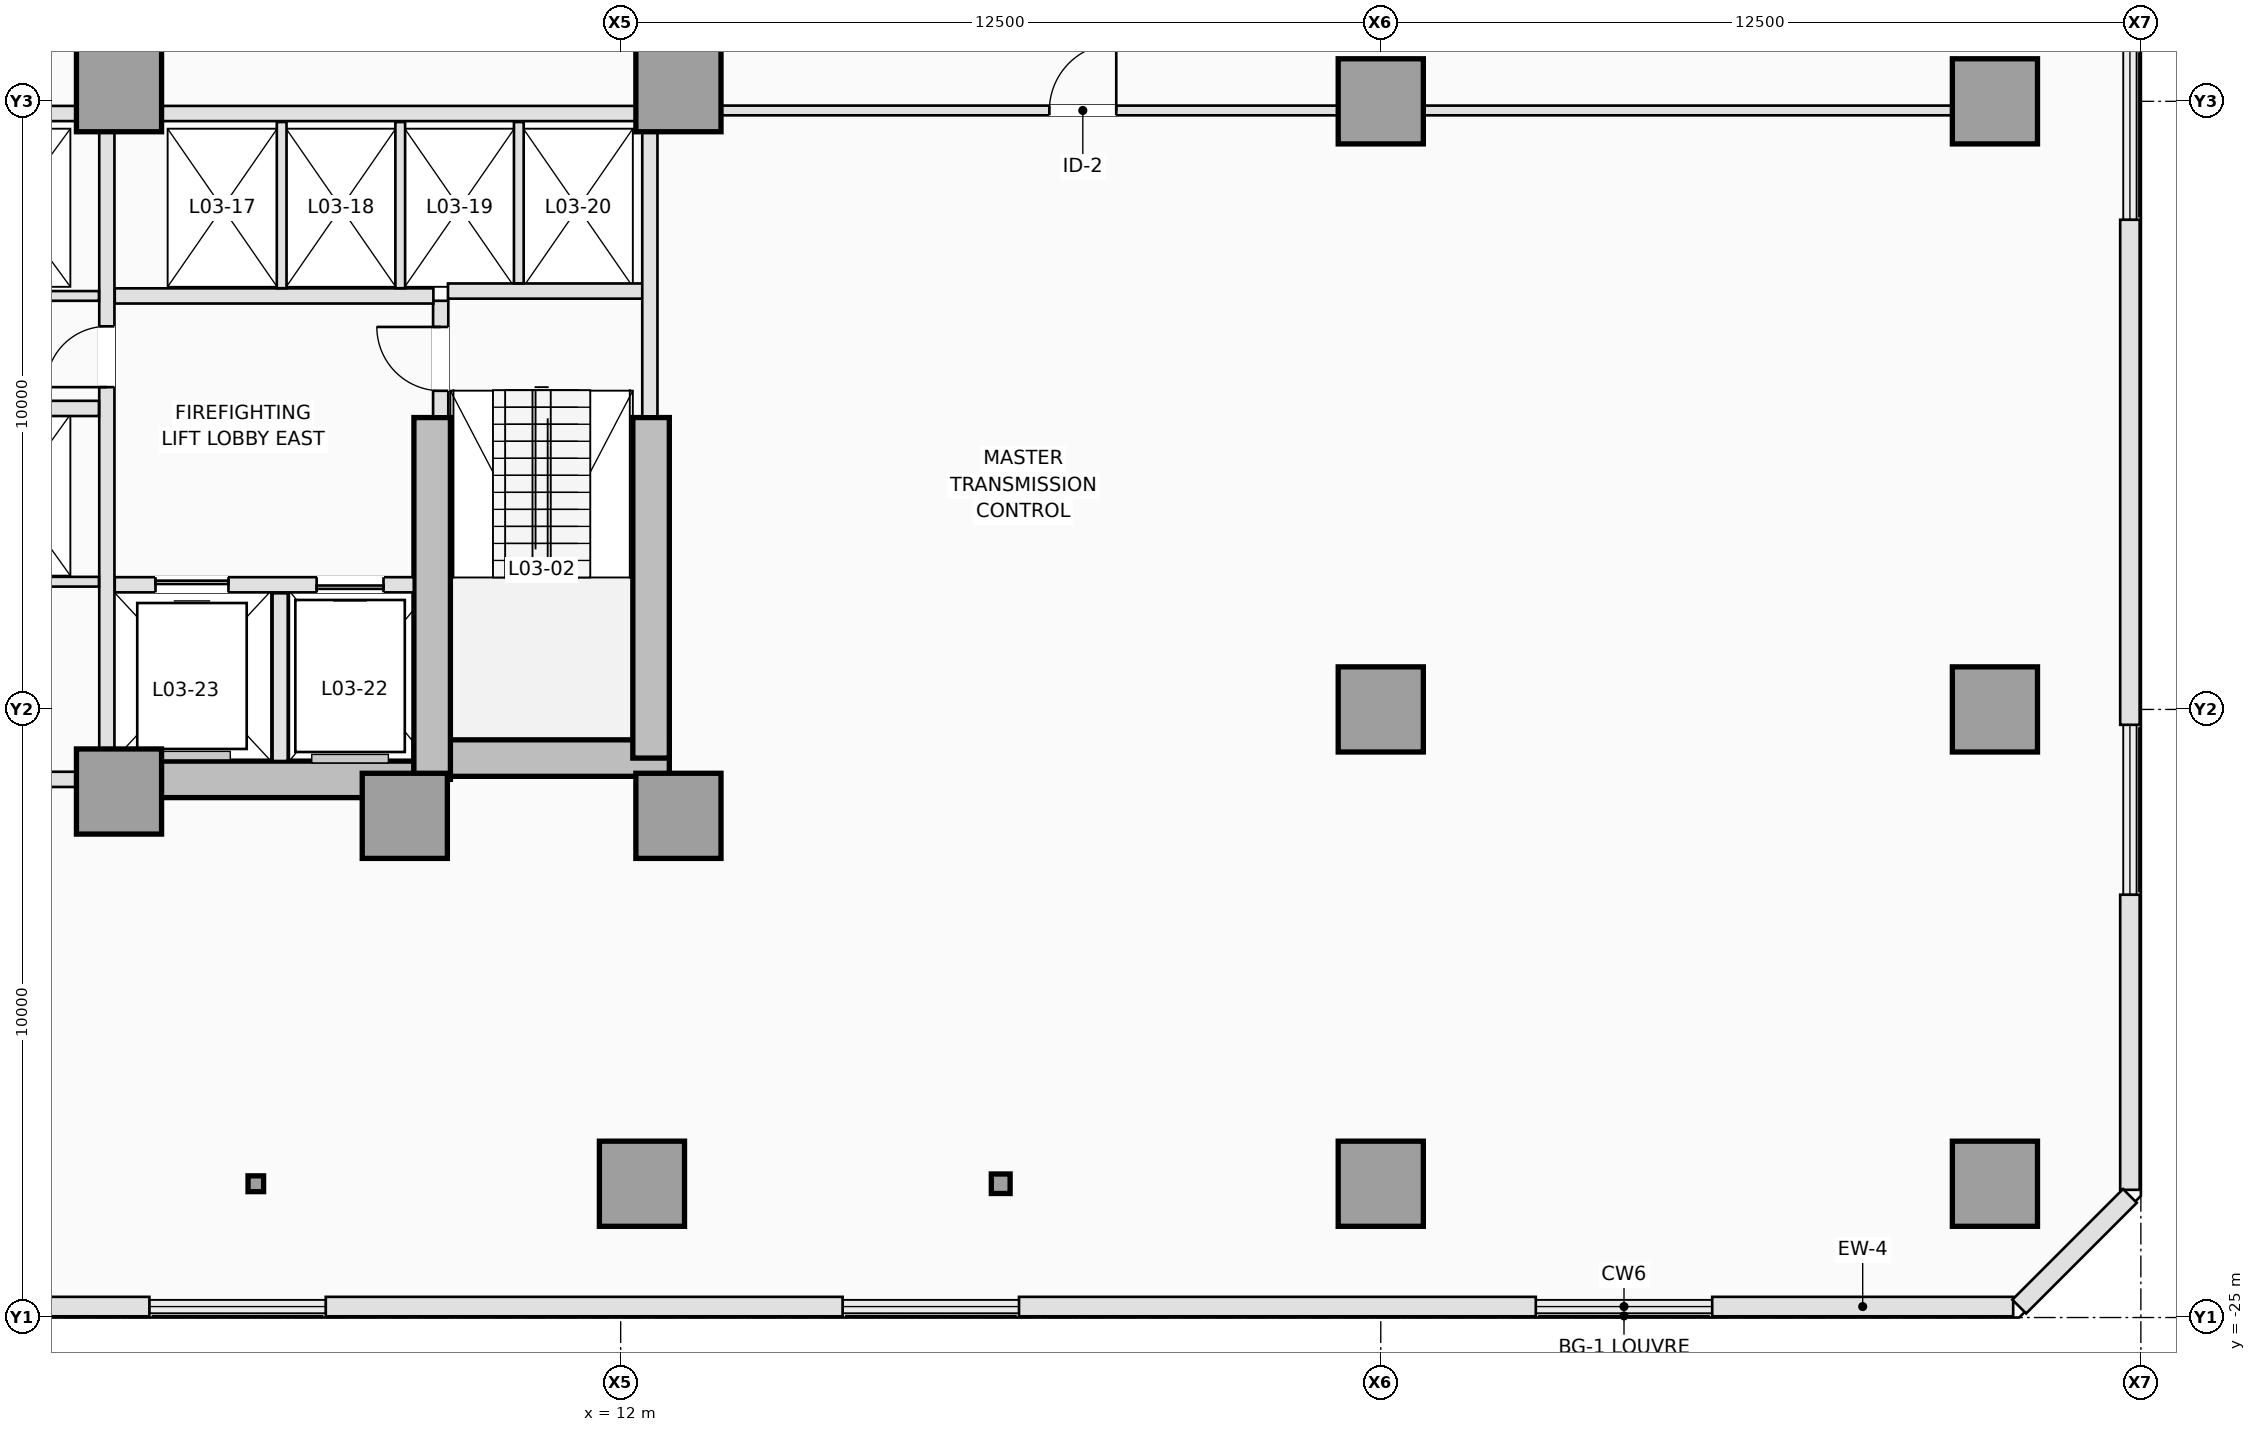
"""IFC4 building model, lengths in metres.
Left out: names, types, materials, properties, quantities, classifications, styles, units other than length and angle.
Written with IfcOpenShell. Run it as: python <this file> out.ifc"""

import sys

from ifc_helpers import new_model, si_unit, direction, frame, frame_2d, origin, origin_2d, place, context, subcontext, project, spatial, rectangle, i_section, extrude, element, fill, save


model = new_model("IFC4")
c1 = context("Model", 3, precision=1e-05, world=origin(), true_north=direction((0.0, 1.0)))
c2 = subcontext(c1, "Body", "Model", "MODEL_VIEW")
j1 = project(units=[si_unit("LENGTHUNIT", "METRE"), si_unit("PLANEANGLEUNIT", "RADIAN")], contexts=[c1])
p1 = place(None, origin())
s1 = spatial("IfcSite", under=j1, at=p1, CompositionType="ELEMENT")
p2 = place(p1, origin())
s2 = spatial("IfcBuilding", under=s1, at=p2, CompositionType="ELEMENT")
p3 = place(p2, frame((0.0, 0.0, 14.0)))
s3 = spatial("IfcBuildingStorey", under=s2, at=p3, CompositionType="ELEMENT", Elevation=14.0)
p4 = place(p3, frame((3.75, -16.15, 0.0), z_axis=(0.0, 0.0, 1.0), x_axis=(1.0, 0.0, 0.0)))
e1 = element("IfcWall", 1, at=p4, inside=s3, PredefinedType="SHEAR", context=c2, shape_type="SweptSolid", body=[
    extrude(rectangle(XDim=5.15, YDim=0.6, at=frame_2d((2.575, 0.0))), origin(), (0.0, 0.0, 1.0), 4.5),
])
p5 = place(p3, frame((8.6, -15.8, 0.0), z_axis=(0.0, 0.0, 1.0), x_axis=(1.0, 0.0, 0.0)))
e2 = element("IfcWall", 2, at=p5, inside=s3, PredefinedType="SHEAR", context=c2, shape_type="SweptSolid", body=[
    extrude(rectangle(XDim=4.2, YDim=0.6, at=frame_2d((2.1, 0.0))), origin(), (0.0, 0.0, 1.0), 4.5),
])
p6 = place(p3, frame((12.5, -15.8, 0.0), z_axis=(0.0, 0.0, 1.0), x_axis=(0.0, 1.0, 0.0)))
e3 = element("IfcWall", 3, at=p6, inside=s3, PredefinedType="SHEAR", context=c2, shape_type="SweptSolid", body=[
    extrude(rectangle(XDim=5.6, YDim=0.6, at=frame_2d((2.8, 0.0))), origin(), (0.0, 0.0, 1.0), 4.5),
])
p7 = place(p3, frame((8.9, -16.15, 0.0), z_axis=(0.0, 0.0, 1.0), x_axis=(0.0, 1.0, 0.0)))
e4 = element("IfcWall", 4, at=p7, inside=s3, PredefinedType="SHEAR", context=c2, shape_type="SweptSolid", body=[
    extrude(rectangle(XDim=5.95, YDim=0.6, at=frame_2d((2.975, 0.0))), origin(), (0.0, 0.0, 1.0), 4.5),
])
for number, where, z_axis, x_axis in (
    (5, (3.75, -16.35, 0.0), (0.0, 0.0, 1.0), (1.0, 0.0, 0.0)),
    (6, (8.45, -16.75, 0.0), (0.0, 0.0, 1.0), (1.0, 0.0, 0.0)),
    (7, (12.95, -16.75, 0.0), (0.0, 0.0, 1.0), (1.0, 0.0, 0.0)),
    (8, (3.75, -4.8, 0.0), (0.0, 0.0, 1.0), (1.0, 0.0, 0.0)),
    (9, (12.95, -4.8, 0.0), (0.0, 0.0, 1.0), (1.0, 0.0, 0.0)),
    (10, (12.35, -22.8, 0.0), (0.0, 0.0, 1.0), (1.0, 0.0, 0.0)),
    (11, (24.5, -22.8, 0.0), (0.0, 0.0, 1.0), (1.0, 0.0, 0.0)),
    (12, (34.6, -22.8, 0.0), (0.0, 0.0, 1.0), (1.0, 0.0, 0.0)),
    (13, (24.5, -15.0, 0.0), (0.0, 0.0, 1.0), (1.0, 0.0, 0.0)),
    (14, (34.6, -15.0, 0.0), (0.0, 0.0, 1.0), (1.0, 0.0, 0.0)),
    (15, (24.5, -5.0, 0.0), (0.0, 0.0, 1.0), (1.0, 0.0, 0.0)),
    (16, (34.6, -5.0, 0.0), (0.0, 0.0, 1.0), (1.0, 0.0, 0.0)),
):
    element("IfcColumn", number, at=place(p3, frame(where, z_axis=z_axis, x_axis=x_axis)), inside=s3, PredefinedType="COLUMN", context=c2, shape_type="SweptSolid", body=[
        extrude(rectangle(XDim=1.4, YDim=1.4, at=origin_2d()), origin(), (0.0, 0.0, 1.0), 4.5),
    ])
p8 = place(p3, frame((18.25, -22.8, 0.0), z_axis=(0.0, 0.0, 1.0), x_axis=(1.0, 0.0, 0.0)))
e17 = element("IfcColumn", 17, at=p8, inside=s3, PredefinedType="COLUMN", context=c2, shape_type="SweptSolid", body=[
    extrude(i_section(OverallWidth=0.309, OverallDepth=0.321, WebThickness=0.014, FlangeThickness=0.022, FilletRadius=0.017, at=origin_2d()), origin(), (0.0, 0.0, 1.0), 4.5),
])
p9 = place(p3, frame((6.0, -22.8, 0.0), z_axis=(0.0, 0.0, 1.0), x_axis=(1.0, 0.0, 0.0)))
e18 = element("IfcColumn", 18, at=p9, inside=s3, PredefinedType="COLUMN", context=c2, shape_type="SweptSolid", body=[
    extrude(i_section(OverallWidth=0.256, OverallDepth=0.26, WebThickness=0.01, FlangeThickness=0.017, FilletRadius=0.014, at=origin_2d()), origin(), (0.0, 0.0, 1.0), 4.5),
])
p10 = place(p3, frame((34.9, -24.82, 0.0), z_axis=(0.0, 0.0, 1.0), x_axis=(-1.0, 0.0, 0.0)))
e19 = element("IfcWall", 19, at=p10, inside=s3, PredefinedType="STANDARD", context=c2, shape_type="SweptSolid", body=[
    extrude(rectangle(XDim=4.949, YDim=0.32, at=frame_2d((2.475, 0.0))), origin(), (0.0, 0.0, 1.0), 4.2),
])
for number, where, z_axis, x_axis in (
    (20, (27.05, -24.82, 0.0), (0.0, 0.0, 1.0), (-1.0, 0.0, 0.0)),
    (21, (15.649, -24.82, 0.0), (0.0, 0.0, 1.0), (-1.0, 0.0, 0.0)),
    (22, (4.25, -24.82, 0.0), (0.0, 0.0, 1.0), (-1.0, 0.0, 0.0)),
):
    element("IfcWall", number, at=place(p3, frame(where, z_axis=z_axis, x_axis=x_axis)), inside=s3, PredefinedType="STANDARD", context=c2, shape_type="SweptSolid", body=[
        extrude(rectangle(XDim=8.499, YDim=0.32, at=frame_2d((4.25, 0.0))), origin(), (0.0, 0.0, 1.0), 4.2),
    ])
p11 = place(p3, frame((36.82, -6.947, 0.0), z_axis=(0.0, 0.0, 1.0), x_axis=(0.0, -1.0, 0.0)))
e23 = element("IfcWall", 23, at=p11, inside=s3, PredefinedType="STANDARD", context=c2, shape_type="SweptSolid", body=[
    extrude(rectangle(XDim=8.305, YDim=0.32, at=frame_2d((4.153, 0.0))), origin(), (0.0, 0.0, 1.0), 4.2),
])
p12 = place(p3, frame((36.82, -18.047, 0.0), z_axis=(0.0, 0.0, 1.0), x_axis=(0.0, -1.0, 0.0)))
e24 = element("IfcWall", 24, at=p12, inside=s3, PredefinedType="STANDARD", context=c2, shape_type="SweptSolid", body=[
    extrude(rectangle(XDim=4.853, YDim=0.32, at=frame_2d((2.426, 0.0))), origin(), (0.0, 0.0, 1.0), 4.2),
])
p13 = place(p3, frame((36.82, -23.0, 0.0), z_axis=(0.0, 0.0, 1.0), x_axis=(-0.707106781187, -0.707106781187, 0.0)))
e25 = element("IfcWall", 25, at=p13, inside=s3, PredefinedType="STANDARD", context=c2, shape_type="SweptSolid", body=[
    extrude(rectangle(XDim=2.574, YDim=0.32, at=frame_2d((1.287, 0.0))), origin(), (0.0, 0.0, 1.0), 4.2),
])
p14 = place(p3, frame((9.04, -10.18, 0.0), z_axis=(0.0, 0.0, 1.0), x_axis=(0.0, 1.0, 0.0)))
e26 = element("IfcWall", 26, at=p14, inside=s3, PredefinedType="PARTITIONING", context=c2, shape_type="SweptSolid", body=[
    extrude(rectangle(XDim=1.9, YDim=0.25, at=frame_2d((0.95, 0.0))), origin(), (0.0, 0.0, 1.0), 4.2),
])
p15 = place(p14, frame((0.42, 0.0, 0.0)))
e27 = element("IfcOpeningElement", 27, at=p15, cuts=e26, PredefinedType="OPENING", context=c2, shape_type="SweptSolid", body=[
    extrude(rectangle(XDim=1.05, YDim=2.15, at=frame_2d((0.525, 1.075))), frame((0.0, 0.135, 0.0), z_axis=(0.0, -1.0, 0.0), x_axis=(1.0, 0.0, 0.0)), (0.0, 0.0, 1.0), 0.27),
])
p16 = place(p3, frame((9.16, -8.12, 0.0), z_axis=(0.0, 0.0, 1.0), x_axis=(1.0, 0.0, 0.0)))
e28 = element("IfcWall", 28, at=p16, inside=s3, PredefinedType="PARTITIONING", context=c2, shape_type="SweptSolid", body=[
    extrude(rectangle(XDim=3.22, YDim=0.25, at=frame_2d((1.61, 0.0))), origin(), (0.0, 0.0, 1.0), 4.2),
])
p17 = place(p3, frame((12.48, -10.18, 0.0), z_axis=(0.0, 0.0, 1.0), x_axis=(0.0, 1.0, 0.0)))
e29 = element("IfcWall", 29, at=p17, inside=s3, PredefinedType="PARTITIONING", context=c2, shape_type="SweptSolid", body=[
    extrude(rectangle(XDim=4.678, YDim=0.25, at=frame_2d((2.339, 0.0))), origin(), (0.0, 0.0, 1.0), 4.2),
])
p18 = place(p3, frame((3.68, -12.95, 0.0), z_axis=(0.0, 0.0, 1.0), x_axis=(1.0, 0.0, 0.0)))
e30 = element("IfcWall", 30, at=p18, inside=s3, PredefinedType="PARTITIONING", context=c2, shape_type="SweptSolid", body=[
    extrude(rectangle(XDim=4.918, YDim=0.25, at=frame_2d((2.459, 0.0))), origin(), (0.0, 0.0, 1.0), 4.2),
])
p19 = place(p18, frame((3.32, 0.0, 0.0)))
e31 = element("IfcOpeningElement", 31, at=p19, cuts=e30, PredefinedType="OPENING", context=c2, shape_type="SweptSolid", body=[
    extrude(rectangle(XDim=1.1, YDim=2.15, at=frame_2d((0.55, 1.075))), frame((0.0, 0.135, 0.0), z_axis=(0.0, -1.0, 0.0), x_axis=(1.0, 0.0, 0.0)), (0.0, 0.0, 1.0), 0.27),
])
p20 = place(p18, frame((0.67, 0.0, 0.0)))
e32 = element("IfcOpeningElement", 32, at=p20, cuts=e30, PredefinedType="OPENING", context=c2, shape_type="SweptSolid", body=[
    extrude(rectangle(XDim=1.2, YDim=2.15, at=frame_2d((0.6, 1.075))), frame((0.0, 0.135, 0.0), z_axis=(0.0, -1.0, 0.0), x_axis=(1.0, 0.0, 0.0)), (0.0, 0.0, 1.0), 0.27),
])
p21 = place(p3, frame((6.4, -15.848, 0.0), z_axis=(0.0, 0.0, 1.0), x_axis=(0.0, 1.0, 0.0)))
e33 = element("IfcWall", 33, at=p21, inside=s3, PredefinedType="PARTITIONING", context=c2, shape_type="SweptSolid", body=[
    extrude(rectangle(XDim=2.758, YDim=0.25, at=frame_2d((1.379, 0.0))), origin(), (0.0, 0.0, 1.0), 4.2),
])
p22 = place(p3, frame((3.68, -8.2, 0.0), z_axis=(0.0, 0.0, 1.0), x_axis=(1.0, 0.0, 0.0)))
e34 = element("IfcWall", 34, at=p22, inside=s3, PredefinedType="PARTITIONING", context=c2, shape_type="SweptSolid", body=[
    extrude(rectangle(XDim=5.24, YDim=0.25, at=frame_2d((2.62, 0.0))), origin(), (0.0, 0.0, 1.0), 4.2),
])
p23 = place(p3, frame((3.55, -15.648, 0.0), z_axis=(0.0, 0.0, 1.0), x_axis=(0.0, 1.0, 0.0)))
e35 = element("IfcWall", 35, at=p23, inside=s3, PredefinedType="PARTITIONING", context=c2, shape_type="SweptSolid", body=[
    extrude(rectangle(XDim=10.146, YDim=0.25, at=frame_2d((5.073, 0.0))), origin(), (0.0, 0.0, 1.0), 4.2),
])
p24 = place(p23, frame((5.948, 0.0, 0.0)))
e36 = element("IfcOpeningElement", 36, at=p24, cuts=e35, PredefinedType="OPENING", context=c2, shape_type="SweptSolid", body=[
    extrude(rectangle(XDim=1.0, YDim=2.15, at=frame_2d((0.5, 1.075))), frame((0.0, 0.135, 0.0), z_axis=(0.0, -1.0, 0.0), x_axis=(1.0, 0.0, 0.0)), (0.0, 0.0, 1.0), 0.27),
])
p25 = place(p3, frame((4.452, -5.2, 0.0), z_axis=(0.0, 0.0, 1.0), x_axis=(1.0, 0.0, 0.0)))
e37 = element("IfcWall", 37, at=p25, inside=s3, PredefinedType="PARTITIONING", context=c2, shape_type="SweptSolid", body=[
    extrude(rectangle(XDim=7.796, YDim=0.25, at=frame_2d((3.898, 0.0))), origin(), (0.0, 0.0, 1.0), 4.2),
])
p26 = place(p3, frame((0.95, -5.2, 0.0), z_axis=(0.0, 0.0, 1.0), x_axis=(1.0, 0.0, 0.0)))
e38 = element("IfcWall", 38, at=p26, inside=s3, PredefinedType="PARTITIONING", context=c2, shape_type="SweptSolid", body=[
    extrude(rectangle(XDim=2.098, YDim=0.25, at=frame_2d((1.049, 0.0))), origin(), (0.0, 0.0, 1.0), 4.2),
])
for number, where, z_axis, x_axis in (
    (39, (6.425, -8.073, 0.0), (0.0, 0.0, 1.0), (0.0, 1.0, 0.0)),
    (40, (8.375, -8.073, 0.0), (0.0, 0.0, 1.0), (0.0, 1.0, 0.0)),
):
    element("IfcWall", number, at=place(p3, frame(where, z_axis=z_axis, x_axis=x_axis)), inside=s3, PredefinedType="PARTITIONING", context=c2, shape_type="SweptSolid", body=[
        extrude(rectangle(XDim=2.733, YDim=0.16, at=frame_2d((1.366, 0.0))), origin(), (0.0, 0.0, 1.0), 4.2),
    ])
p27 = place(p3, frame((10.325, -7.993, 0.0), z_axis=(0.0, 0.0, 1.0), x_axis=(0.0, 1.0, 0.0)))
e41 = element("IfcWall", 41, at=p27, inside=s3, PredefinedType="PARTITIONING", context=c2, shape_type="SweptSolid", body=[
    extrude(rectangle(XDim=2.653, YDim=0.16, at=frame_2d((1.326, 0.0))), origin(), (0.0, 0.0, 1.0), 4.2),
])
p28 = place(p3, frame((-3.048, -16.15, 0.0), z_axis=(0.0, 0.0, 1.0), x_axis=(1.0, 0.0, 0.0)))
e42 = element("IfcWall", 42, at=p28, inside=s3, PredefinedType="PARTITIONING", context=c2, shape_type="SweptSolid", body=[
    extrude(rectangle(XDim=6.096, YDim=0.25, at=frame_2d((3.048, 0.0))), origin(), (0.0, 0.0, 1.0), 3.176),
])
p29 = place(p3, frame((0.95, -8.2, 0.0), z_axis=(0.0, 0.0, 1.0), x_axis=(1.0, 0.0, 0.0)))
e43 = element("IfcWall", 43, at=p29, inside=s3, PredefinedType="PARTITIONING", context=c2, shape_type="SweptSolid", body=[
    extrude(rectangle(XDim=2.47, YDim=0.16, at=frame_2d((1.235, 0.0))), origin(), (0.0, 0.0, 1.0), 4.2),
])
p30 = place(p3, frame((0.95, -10.05, 0.0), z_axis=(0.0, 0.0, 1.0), x_axis=(1.0, 0.0, 0.0)))
e44 = element("IfcWall", 44, at=p30, inside=s3, PredefinedType="PARTITIONING", context=c2, shape_type="SweptSolid", body=[
    extrude(rectangle(XDim=2.47, YDim=0.25, at=frame_2d((1.235, 0.0))), origin(), (0.0, 0.0, 1.0), 4.2),
])
p31 = place(p3, frame((-3.42, -12.9, 0.0), z_axis=(0.0, 0.0, 1.0), x_axis=(1.0, 0.0, 0.0)))
e45 = element("IfcWall", 45, at=p31, inside=s3, PredefinedType="PARTITIONING", context=c2, shape_type="SweptSolid", body=[
    extrude(rectangle(XDim=6.84, YDim=0.16, at=frame_2d((3.42, 0.0))), origin(), (0.0, 0.0, 1.0), 4.2),
])
p32 = place(p31, frame((2.98, 0.0, 0.0)))
e46 = element("IfcOpeningElement", 46, at=p32, cuts=e45, PredefinedType="OPENING", context=c2, shape_type="SweptSolid", body=[
    extrude(rectangle(XDim=0.88, YDim=2.12, at=frame_2d((0.44, 1.06))), frame((0.0, 0.09, 0.0), z_axis=(0.0, -1.0, 0.0), x_axis=(1.0, 0.0, 0.0)), (0.0, 0.0, 1.0), 0.18),
])
p33 = place(p3, frame((13.652, -5.15, 0.0), z_axis=(0.0, 0.0, 1.0), x_axis=(1.0, 0.0, 0.0)))
e47 = element("IfcWall", 47, at=p33, inside=s3, PredefinedType="PARTITIONING", context=c2, shape_type="SweptSolid", body=[
    extrude(rectangle(XDim=10.146, YDim=0.16, at=frame_2d((5.073, 0.0))), origin(), (0.0, 0.0, 1.0), 3.176),
])
p34 = place(p33, frame((5.398, 0.0, 0.0)))
e48 = element("IfcOpeningElement", 48, at=p34, cuts=e47, PredefinedType="OPENING", context=c2, shape_type="SweptSolid", body=[
    extrude(rectangle(XDim=1.1, YDim=2.15, at=frame_2d((0.55, 1.075))), frame((0.0, 0.09, 0.0), z_axis=(0.0, -1.0, 0.0), x_axis=(1.0, 0.0, 0.0)), (0.0, 0.0, 1.0), 0.18),
])
p35 = place(p3, frame((25.202, -5.15, 0.0), z_axis=(0.0, 0.0, 1.0), x_axis=(1.0, 0.0, 0.0)))
e49 = element("IfcWall", 49, at=p35, inside=s3, PredefinedType="PARTITIONING", context=c2, shape_type="SweptSolid", body=[
    extrude(rectangle(XDim=8.696, YDim=0.16, at=frame_2d((4.348, 0.0))), origin(), (0.0, 0.0, 1.0), 3.176),
])
p36 = place(p19, origin())
e50 = element("IfcDoor", 50, at=p36, inside=s3, OperationType="SLIDING_TO_RIGHT", PredefinedType="DOOR", context=c2, shape_type="SweptSolid", body=[
    extrude(rectangle(XDim=1.1, YDim=2.15, at=frame_2d((0.55, 1.075))), frame((0.0, 0.025, 0.0), z_axis=(0.0, -1.0, 0.0), x_axis=(1.0, 0.0, 0.0)), (0.0, 0.0, 1.0), 0.05),
])
fill(e31, e50)
p37 = place(p20, origin())
e51 = element("IfcDoor", 51, at=p37, inside=s3, OperationType="SLIDING_TO_LEFT", PredefinedType="DOOR", context=c2, shape_type="SweptSolid", body=[
    extrude(rectangle(XDim=1.2, YDim=2.15, at=frame_2d((0.6, 1.075))), frame((0.0, 0.025, 0.0), z_axis=(0.0, -1.0, 0.0), x_axis=(1.0, 0.0, 0.0)), (0.0, 0.0, 1.0), 0.05),
])
fill(e32, e51)
p38 = place(p15, origin())
e52 = element("IfcDoor", 52, at=p38, inside=s3, OperationType="SINGLE_SWING_RIGHT", PredefinedType="DOOR", context=c2, shape_type="SweptSolid", body=[
    extrude(rectangle(XDim=1.05, YDim=2.15, at=frame_2d((0.525, 1.075))), frame((0.0, 0.025, 0.0), z_axis=(0.0, -1.0, 0.0), x_axis=(1.0, 0.0, 0.0)), (0.0, 0.0, 1.0), 0.05),
])
fill(e27, e52)
p39 = place(p24, origin())
e53 = element("IfcDoor", 53, at=p39, inside=s3, OperationType="SINGLE_SWING_LEFT", PredefinedType="DOOR", context=c2, shape_type="SweptSolid", body=[
    extrude(rectangle(XDim=1.0, YDim=2.15, at=frame_2d((0.5, 1.075))), frame((0.0, 0.025, 0.0), z_axis=(0.0, -1.0, 0.0), x_axis=(1.0, 0.0, 0.0)), (0.0, 0.0, 1.0), 0.05),
])
fill(e36, e53)
p40 = place(p34, origin())
e54 = element("IfcDoor", 54, at=p40, inside=s3, OperationType="SINGLE_SWING_RIGHT", PredefinedType="DOOR", context=c2, shape_type="SweptSolid", body=[
    extrude(rectangle(XDim=1.1, YDim=2.15, at=frame_2d((0.55, 1.075))), frame((0.0, 0.025, 0.0), z_axis=(0.0, -1.0, 0.0), x_axis=(1.0, 0.0, 0.0)), (0.0, 0.0, 1.0), 0.05),
])
fill(e48, e54)
save(model, sys.argv[1])
